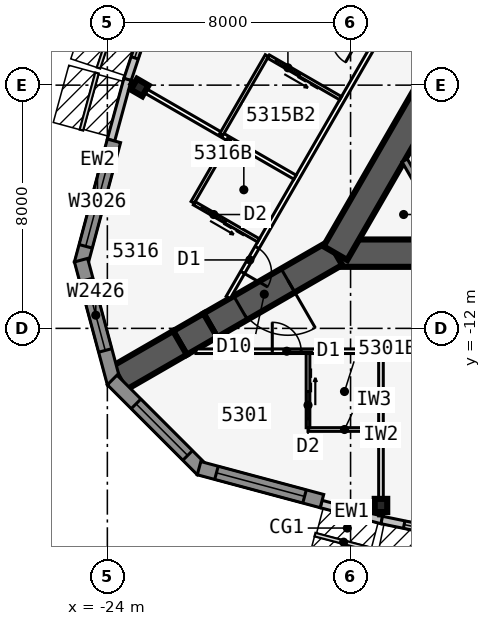
"""IFC4 building model, lengths in metres.
Left out: names, types, materials, properties, quantities, classifications, styles, units other than length and angle.
Written with IfcOpenShell. Run it as: python <this file> out.ifc"""

import sys

from ifc_helpers import new_model, si_unit, direction, frame, frame_2d, origin, origin_2d, place, context, subcontext, project, spatial, polyline, rectangle, i_section, outline, extrude, element, fill, save


model = new_model("IFC4")
c1 = context("Model", 3, precision=1e-05, world=origin(), true_north=direction((0.0, 1.0)))
c2 = subcontext(c1, "Body", "Model", "MODEL_VIEW")
j1 = project(units=[si_unit("LENGTHUNIT", "METRE"), si_unit("PLANEANGLEUNIT", "RADIAN")], contexts=[c1])
p1 = place(None, origin())
s1 = spatial("IfcSite", under=j1, at=p1, CompositionType="ELEMENT")
p2 = place(p1, origin())
s2 = spatial("IfcBuilding", under=s1, at=p2, CompositionType="ELEMENT")
p3 = place(p2, frame((0.0, 0.0, 200.9)))
s3 = spatial("IfcBuildingStorey", under=s2, at=p3, CompositionType="ELEMENT", Elevation=200.9)
p4 = place(p3, frame((-16.5, -9.526, 0.0), z_axis=(0.0, 0.0, 1.0), x_axis=(1.0, 0.0, 0.0)))
e1 = element("IfcWall", 1, at=p4, inside=s3, PredefinedType="SHEAR", context=c2, shape_type="SweptSolid", body=[
    extrude(rectangle(XDim=33.0, YDim=0.9, at=frame_2d((16.5, 0.0))), origin(), (0.0, 0.0, 1.0), 3.6),
])
p5 = place(p4, frame((14.05, 0.0, 0.0)))
e2 = element("IfcOpeningElement", 2, at=p5, cuts=e1, PredefinedType="OPENING", context=c2, shape_type="SweptSolid", body=[
    extrude(rectangle(XDim=1.8, YDim=2.13, at=frame_2d((0.9, 1.065))), frame((0.0, 0.46, 0.0), z_axis=(0.0, -1.0, 0.0), x_axis=(1.0, 0.0, 0.0)), (0.0, 0.0, 1.0), 0.92),
])
p6 = place(p3, frame((0.0, 19.052, 0.0), z_axis=(0.0, 0.0, 1.0), x_axis=(-0.499999749417, -0.866025548458, 0.0)))
e3 = element("IfcWall", 3, at=p6, inside=s3, PredefinedType="SHEAR", context=c2, shape_type="SweptSolid", body=[
    extrude(rectangle(XDim=33.0, YDim=0.9, at=frame_2d((16.5, 0.0))), origin(), (0.0, 0.0, 1.0), 3.6),
])
p7 = place(p6, frame((14.15, 0.0, 0.0)))
e4 = element("IfcOpeningElement", 4, at=p7, cuts=e3, PredefinedType="OPENING", context=c2, shape_type="SweptSolid", body=[
    extrude(rectangle(XDim=1.8, YDim=2.13, at=frame_2d((0.9, 1.065))), frame((0.0, 0.46, 0.0), z_axis=(0.0, -1.0, 0.0), x_axis=(1.0, 0.0, 0.0)), (0.0, 0.0, 1.0), 0.92),
])
p8 = place(p6, frame((12.6, 0.0, 0.0)))
e5 = element("IfcOpeningElement", 5, at=p8, cuts=e3, PredefinedType="OPENING", context=c2, shape_type="SweptSolid", body=[
    extrude(rectangle(XDim=1.0, YDim=2.13, at=frame_2d((0.5, 1.065))), frame((0.0, 0.46, 0.0), z_axis=(0.0, -1.0, 0.0), x_axis=(1.0, 0.0, 0.0)), (0.0, 0.0, 1.0), 0.92),
])
p9 = place(p3, frame((-16.5, -9.526, 0.0), z_axis=(0.0, 0.0, 1.0), x_axis=(-0.866031398331, -0.499989616998, 0.0)))
e6 = element("IfcWall", 6, at=p9, inside=s3, PredefinedType="SHEAR", context=c2, shape_type="SweptSolid", body=[
    extrude(rectangle(XDim=4.746, YDim=0.9, at=frame_2d((2.373, 0.0))), origin(), (0.0, 0.0, 1.0), 3.6),
])
p10 = place(p9, frame((1.8, 0.0, 0.0)))
e7 = element("IfcOpeningElement", 7, at=p10, cuts=e6, PredefinedType="OPENING", context=c2, shape_type="SweptSolid", body=[
    extrude(rectangle(XDim=1.8, YDim=2.13, at=frame_2d((0.9, 1.065))), frame((0.0, 0.46, 0.0), z_axis=(0.0, -1.0, 0.0), x_axis=(1.0, 0.0, 0.0)), (0.0, 0.0, 1.0), 0.92),
])
p11 = place(p3, frame((-20.61, -11.899, 0.0), z_axis=(0.0, 0.0, 1.0), x_axis=(-0.866009537788, -0.500027479704, 0.0)))
e8 = element("IfcWall", 8, at=p11, inside=s3, PredefinedType="SHEAR", context=c2, shape_type="SweptSolid", body=[
    extrude(rectangle(XDim=1.155, YDim=0.9, at=frame_2d((0.577, 0.0))), origin(), (0.0, 0.0, 1.0), 3.6),
])
p12 = place(p3, frame((-21.61, -12.477, 0.0), z_axis=(0.0, 0.0, 1.0), x_axis=(-0.866055313784, -0.499948190782, 0.0)))
e9 = element("IfcWall", 9, at=p12, inside=s3, PredefinedType="SHEAR", context=c2, shape_type="SweptSolid", body=[
    extrude(rectangle(XDim=2.309, YDim=0.9, at=frame_2d((1.155, 0.0))), origin(), (0.0, 0.0, 1.0), 3.6),
])
for number, where, z_axis, x_axis in (
    (10, (-15.0, -17.825, 0.0), (0.0, 0.0, 1.0), (1.0, 0.0, 0.0)),
    (11, (-22.937, -4.078, 0.0), (0.0, 0.0, 1.0), (-0.5, -0.866, 0.0)),
):
    element("IfcColumn", number, at=place(p3, frame(where, z_axis=z_axis, x_axis=x_axis)), inside=s3, PredefinedType="COLUMN", context=c2, shape_type="SweptSolid", body=[
        extrude(i_section(OverallWidth=0.411, OverallDepth=0.434, WebThickness=0.036, FlangeThickness=0.057, at=origin_2d()), origin(), (0.0, 0.0, 1.0), 3.6),
    ])
p13 = place(p3, frame((-16.968, -17.777, 0.0), z_axis=(0.0, 0.0, 1.0), x_axis=(0.967010286052, -0.254737328772, 0.0)))
e12 = element("IfcWall", 12, at=p13, inside=s3, PredefinedType="STANDARD", context=c2, shape_type="SweptSolid", body=[
    extrude(rectangle(XDim=2.068, YDim=0.25, at=frame_2d((1.034, 0.0))), origin(), (0.0, 0.0, 1.0), 3.435),
])
p14 = place(p3, frame((-14.975, -18.302, 0.0), z_axis=(0.0, 0.0, 1.0), x_axis=(0.979461488189, -0.201631329795, 0.0)))
e13 = element("IfcWall", 13, at=p14, inside=s3, PredefinedType="STANDARD", context=c2, shape_type="SweptSolid", body=[
    extrude(rectangle(XDim=5.105, YDim=0.25, at=frame_2d((2.552, 0.0))), origin(), (0.0, 0.0, 1.0), 3.435),
])
p15 = place(p14, frame((0.752, 0.0, 0.45)))
e14 = element("IfcOpeningElement", 14, at=p15, cuts=e13, PredefinedType="OPENING", context=c2, shape_type="SweptSolid", body=[
    extrude(rectangle(XDim=3.6, YDim=2.6, at=frame_2d((1.8, 1.3))), frame((0.0, 0.135, 0.0), z_axis=(0.0, -1.0, 0.0), x_axis=(1.0, 0.0, 0.0)), (0.0, 0.0, 1.0), 0.27),
])
p16 = place(p3, frame((-21.729, 1.028, 0.0), z_axis=(0.0, 0.0, 1.0), x_axis=(-0.315108478109, -0.949055660656, 0.0)))
e15 = element("IfcWall", 15, at=p16, inside=s3, PredefinedType="STANDARD", context=c2, shape_type="SweptSolid", body=[
    extrude(rectangle(XDim=5.105, YDim=0.25, at=frame_2d((2.552, 0.0))), origin(), (0.0, 0.0, 1.0), 3.435),
])
p17 = place(p16, frame((0.752, 0.0, 0.45)))
e16 = element("IfcOpeningElement", 16, at=p17, cuts=e15, PredefinedType="OPENING", context=c2, shape_type="SweptSolid", body=[
    extrude(rectangle(XDim=3.6, YDim=2.6, at=frame_2d((1.8, 1.3))), frame((0.0, 0.135, 0.0), z_axis=(0.0, -1.0, 0.0), x_axis=(1.0, 0.0, 0.0)), (0.0, 0.0, 1.0), 0.27),
])
p18 = place(p3, frame((-23.336, -3.811, 0.0), z_axis=(0.0, 0.0, 1.0), x_axis=(-0.262867703986, -0.964831887015, 0.0)))
e17 = element("IfcWall", 17, at=p18, inside=s3, PredefinedType="STANDARD", context=c2, shape_type="SweptSolid", body=[
    extrude(rectangle(XDim=2.068, YDim=0.25, at=frame_2d((1.034, 0.0))), origin(), (0.0, 0.0, 1.0), 3.435),
])
p19 = place(p3, frame((-23.783, -5.832, 0.0), z_axis=(0.0, 0.0, 1.0), x_axis=(-0.258784695888, -0.965935029479, 0.0)))
e18 = element("IfcWall", 18, at=p19, inside=s3, PredefinedType="SOLIDWALL", context=c2, shape_type="SweptSolid", body=[
    extrude(rectangle(XDim=4.184, YDim=0.45, at=frame_2d((2.092, 0.0))), origin(), (0.0, 0.0, 1.0), 3.435),
])
p20 = place(p19, frame((0.592, 0.0, 0.45)))
e19 = element("IfcOpeningElement", 19, at=p20, cuts=e18, PredefinedType="OPENING", context=c2, shape_type="SweptSolid", body=[
    extrude(rectangle(XDim=3.0, YDim=2.6, at=frame_2d((1.5, 1.3))), frame((0.0, 0.235, 0.0), z_axis=(0.0, -1.0, 0.0), x_axis=(1.0, 0.0, 0.0)), (0.0, 0.0, 1.0), 0.47),
])
p21 = place(p3, frame((-24.865, -9.757, 0.0), z_axis=(0.0, 0.0, 1.0), x_axis=(0.258799282522, -0.96593112144, 0.0)))
e20 = element("IfcWall", 20, at=p21, inside=s3, PredefinedType="SOLIDWALL", context=c2, shape_type="SweptSolid", body=[
    extrude(outline(polyline([(4.184, 0.225), (4.125, 0.225), (3.633, 0.093), (3.597, 0.225), (0.0, 0.225), (0.0, -0.225), (4.184, -0.225), (4.184, 0.225)])), origin(), (0.0, 0.0, 1.0), 3.435),
])
p22 = place(p21, frame((0.674, 0.0, 0.45)))
e21 = element("IfcOpeningElement", 21, at=p22, cuts=e20, PredefinedType="OPENING", context=c2, shape_type="SweptSolid", body=[
    extrude(rectangle(XDim=2.4, YDim=2.6, at=frame_2d((1.2, 1.3))), frame((0.0, 0.235, 0.0), z_axis=(0.0, -1.0, 0.0), x_axis=(1.0, 0.0, 0.0)), (0.0, 0.0, 1.0), 0.47),
])
p23 = place(p3, frame((-23.841, -13.697, 0.0), z_axis=(0.0, 0.0, 1.0), x_axis=(0.707077605902, -0.707135955267, 0.0)))
e22 = element("IfcWall", 22, at=p23, inside=s3, PredefinedType="SOLIDWALL", context=c2, shape_type="SweptSolid", body=[
    extrude(outline(polyline([(4.184, 0.225), (0.586, 0.225), (0.551, 0.093), (0.059, 0.225), (0.0, 0.225), (0.0, -0.225), (4.184, -0.225), (4.184, 0.225)])), origin(), (0.0, 0.0, 1.0), 3.435),
])
p24 = place(p23, frame((1.11, 0.0, 0.45)))
e23 = element("IfcOpeningElement", 23, at=p24, cuts=e22, PredefinedType="OPENING", context=c2, shape_type="SweptSolid", body=[
    extrude(rectangle(XDim=2.4, YDim=2.6, at=frame_2d((1.2, 1.3))), frame((0.0, 0.235, 0.0), z_axis=(0.0, -1.0, 0.0), x_axis=(1.0, 0.0, 0.0)), (0.0, 0.0, 1.0), 0.47),
])
p25 = place(p3, frame((-20.983, -16.598, 0.0), z_axis=(0.0, 0.0, 1.0), x_axis=(0.965920442324, -0.258839137498, 0.0)))
e24 = element("IfcWall", 24, at=p25, inside=s3, PredefinedType="SOLIDWALL", context=c2, shape_type="SweptSolid", body=[
    extrude(rectangle(XDim=4.184, YDim=0.45, at=frame_2d((2.092, 0.0))), origin(), (0.0, 0.0, 1.0), 3.435),
])
p26 = place(p25, frame((0.592, 0.0, 0.45)))
e25 = element("IfcOpeningElement", 25, at=p26, cuts=e24, PredefinedType="OPENING", context=c2, shape_type="SweptSolid", body=[
    extrude(rectangle(XDim=3.0, YDim=2.6, at=frame_2d((1.5, 1.3))), frame((0.0, 0.235, 0.0), z_axis=(0.0, -1.0, 0.0), x_axis=(1.0, 0.0, 0.0)), (0.0, 0.0, 1.0), 0.47),
])
p27 = place(p3, frame((-21.086, -12.751, 0.0), z_axis=(0.0, 0.0, 1.0), x_axis=(1.0, 0.0, 0.0)))
e26 = element("IfcWall", 26, at=p27, inside=s3, PredefinedType="PARTITIONING", context=c2, shape_type="SweptSolid", body=[
    extrude(rectangle(XDim=42.172, YDim=0.15, at=frame_2d((21.086, 0.0))), origin(), (0.0, 0.0, 1.0), 3.435),
])
p28 = place(p27, frame((2.511, 0.0, 0.0)))
e27 = element("IfcOpeningElement", 27, at=p28, cuts=e26, PredefinedType="OPENING", context=c2, shape_type="SweptSolid", body=[
    extrude(rectangle(XDim=0.95, YDim=2.13, at=frame_2d((0.475, 1.065))), frame((0.0, 0.085, 0.0), z_axis=(0.0, -1.0, 0.0), x_axis=(1.0, 0.0, 0.0)), (0.0, 0.0, 1.0), 0.17),
])
p29 = place(p27, frame((8.111, 0.0, 0.0)))
e28 = element("IfcOpeningElement", 28, at=p29, cuts=e26, PredefinedType="OPENING", context=c2, shape_type="SweptSolid", body=[
    extrude(rectangle(XDim=0.95, YDim=2.13, at=frame_2d((0.475, 1.065))), frame((0.0, 0.085, 0.0), z_axis=(0.0, -1.0, 0.0), x_axis=(1.0, 0.0, 0.0)), (0.0, 0.0, 1.0), 0.17),
])
p30 = place(p27, frame((18.711, 0.0, 0.0)))
e29 = element("IfcOpeningElement", 29, at=p30, cuts=e26, PredefinedType="OPENING", context=c2, shape_type="SweptSolid", body=[
    extrude(rectangle(XDim=0.95, YDim=2.13, at=frame_2d((0.475, 1.065))), frame((0.0, 0.085, 0.0), z_axis=(0.0, -1.0, 0.0), x_axis=(1.0, 0.0, 0.0)), (0.0, 0.0, 1.0), 0.17),
])
p31 = place(p27, frame((23.086, 0.0, 0.0)))
e30 = element("IfcOpeningElement", 30, at=p31, cuts=e26, PredefinedType="OPENING", context=c2, shape_type="SweptSolid", body=[
    extrude(rectangle(XDim=1.0, YDim=2.13, at=frame_2d((0.5, 1.065))), frame((0.0, 0.085, 0.0), z_axis=(0.0, -1.0, 0.0), x_axis=(1.0, 0.0, 0.0)), (0.0, 0.0, 1.0), 0.17),
])
p32 = place(p27, frame((29.311, 0.0, 0.0)))
e31 = element("IfcOpeningElement", 31, at=p32, cuts=e26, PredefinedType="OPENING", context=c2, shape_type="SweptSolid", body=[
    extrude(rectangle(XDim=0.95, YDim=2.13, at=frame_2d((0.475, 1.065))), frame((0.0, 0.085, 0.0), z_axis=(0.0, -1.0, 0.0), x_axis=(1.0, 0.0, 0.0)), (0.0, 0.0, 1.0), 0.17),
])
p33 = place(p27, frame((38.711, 0.0, 0.0)))
e32 = element("IfcOpeningElement", 32, at=p33, cuts=e26, PredefinedType="OPENING", context=c2, shape_type="SweptSolid", body=[
    extrude(rectangle(XDim=0.95, YDim=2.13, at=frame_2d((0.475, 1.065))), frame((0.0, 0.085, 0.0), z_axis=(0.0, -1.0, 0.0), x_axis=(1.0, 0.0, 0.0)), (0.0, 0.0, 1.0), 0.17),
])
p34 = place(p3, frame((-15.0, -12.826, 0.0), z_axis=(0.0, 0.0, 1.0), x_axis=(0.0, -1.0, 0.0)))
e33 = element("IfcWall", 33, at=p34, inside=s3, PredefinedType="PARTITIONING", context=c2, shape_type="SweptSolid", body=[
    extrude(rectangle(XDim=5.34, YDim=0.15, at=frame_2d((2.67, 0.0))), origin(), (0.0, 0.0, 1.0), 2.589),
])
p35 = place(p3, frame((-17.4, -15.326, 0.0), z_axis=(0.0, 0.0, 1.0), x_axis=(1.0, 0.0, 0.0)))
e34 = element("IfcWall", 34, at=p35, inside=s3, PredefinedType="PLUMBINGWALL", context=c2, shape_type="SweptSolid", body=[
    extrude(rectangle(XDim=2.4, YDim=0.12, at=frame_2d((1.2, 0.0))), origin(), (0.0, 0.0, 1.0), 3.435),
])
p36 = place(p3, frame((-17.4, -12.826, 0.0), z_axis=(0.0, 0.0, 1.0), x_axis=(0.0, -1.0, 0.0)))
e35 = element("IfcWall", 35, at=p36, inside=s3, PredefinedType="PLUMBINGWALL", context=c2, shape_type="SweptSolid", body=[
    extrude(rectangle(XDim=2.44, YDim=0.12, at=frame_2d((1.22, 0.0))), origin(), (0.0, 0.0, 1.0), 3.435),
])
p37 = place(p36, frame((1.25, 0.0, 0.0)))
e36 = element("IfcOpeningElement", 36, at=p37, cuts=e35, PredefinedType="OPENING", context=c2, shape_type="SweptSolid", body=[
    extrude(rectangle(XDim=0.9, YDim=2.13, at=frame_2d((0.45, 1.065))), frame((0.0, 0.07, 0.0), z_axis=(0.0, -1.0, 0.0), x_axis=(1.0, 0.0, 0.0)), (0.0, 0.0, 1.0), 0.14),
])
p38 = place(p3, frame((-0.5, 22.836, 0.0), z_axis=(0.0, 0.0, 1.0), x_axis=(-0.500001677587, -0.866024435227, 0.0)))
e37 = element("IfcWall", 37, at=p38, inside=s3, PredefinedType="PARTITIONING", context=c2, shape_type="SweptSolid", body=[
    extrude(rectangle(XDim=39.054, YDim=0.15, at=frame_2d((19.527, 0.0))), origin(), (0.0, 0.0, 1.0), 3.435),
])
p39 = place(p38, frame((0.952, 0.0, 0.0)))
e38 = element("IfcOpeningElement", 38, at=p39, cuts=e37, PredefinedType="OPENING", context=c2, shape_type="SweptSolid", body=[
    extrude(rectangle(XDim=0.95, YDim=2.13, at=frame_2d((0.475, 1.065))), frame((0.0, 0.085, 0.0), z_axis=(0.0, -1.0, 0.0), x_axis=(1.0, 0.0, 0.0)), (0.0, 0.0, 1.0), 0.17),
])
p40 = place(p38, frame((7.752, 0.0, 0.0)))
e39 = element("IfcOpeningElement", 39, at=p40, cuts=e37, PredefinedType="OPENING", context=c2, shape_type="SweptSolid", body=[
    extrude(rectangle(XDim=0.95, YDim=2.13, at=frame_2d((0.475, 1.065))), frame((0.0, 0.085, 0.0), z_axis=(0.0, -1.0, 0.0), x_axis=(1.0, 0.0, 0.0)), (0.0, 0.0, 1.0), 0.17),
])
p41 = place(p38, frame((17.152, 0.0, 0.0)))
e40 = element("IfcOpeningElement", 40, at=p41, cuts=e37, PredefinedType="OPENING", context=c2, shape_type="SweptSolid", body=[
    extrude(rectangle(XDim=0.95, YDim=2.13, at=frame_2d((0.475, 1.065))), frame((0.0, 0.085, 0.0), z_axis=(0.0, -1.0, 0.0), x_axis=(1.0, 0.0, 0.0)), (0.0, 0.0, 1.0), 0.17),
])
p42 = place(p38, frame((26.552, 0.0, 0.0)))
e41 = element("IfcOpeningElement", 41, at=p42, cuts=e37, PredefinedType="OPENING", context=c2, shape_type="SweptSolid", body=[
    extrude(rectangle(XDim=0.95, YDim=2.13, at=frame_2d((0.475, 1.065))), frame((0.0, 0.085, 0.0), z_axis=(0.0, -1.0, 0.0), x_axis=(1.0, 0.0, 0.0)), (0.0, 0.0, 1.0), 0.17),
])
p43 = place(p38, frame((37.152, 0.0, 0.0)))
e42 = element("IfcOpeningElement", 42, at=p43, cuts=e37, PredefinedType="OPENING", context=c2, shape_type="SweptSolid", body=[
    extrude(rectangle(XDim=0.95, YDim=2.13, at=frame_2d((0.475, 1.065))), frame((0.0, 0.085, 0.0), z_axis=(0.0, -1.0, 0.0), x_axis=(1.0, 0.0, 0.0)), (0.0, 0.0, 1.0), 0.17),
])
p44 = place(p3, frame((-17.829, -7.027, 0.0), z_axis=(0.0, 0.0, 1.0), x_axis=(-0.866026604282, 0.499997920671, 0.0)))
e43 = element("IfcWall", 43, at=p44, inside=s3, PredefinedType="PARTITIONING", context=c2, shape_type="SweptSolid", body=[
    extrude(rectangle(XDim=6.24, YDim=0.15, at=frame_2d((3.12, 0.0))), origin(), (0.0, 0.0, 1.0), 2.589),
])
p45 = place(p3, frame((-18.753, -3.029, 0.0), z_axis=(0.0, 0.0, 1.0), x_axis=(-0.50002537861, -0.866010750942, 0.0)))
e44 = element("IfcWall", 44, at=p45, inside=s3, PredefinedType="PLUMBINGWALL", context=c2, shape_type="SweptSolid", body=[
    extrude(rectangle(XDim=3.0, YDim=0.12, at=frame_2d((1.5, 0.0))), origin(), (0.0, 0.0, 1.0), 3.435),
])
p46 = place(p3, frame((-16.329, -4.429, 0.0), z_axis=(0.0, 0.0, 1.0), x_axis=(-0.865997131366, 0.500048966069, 0.0)))
e45 = element("IfcWall", 45, at=p46, inside=s3, PredefinedType="PLUMBINGWALL", context=c2, shape_type="SweptSolid", body=[
    extrude(rectangle(XDim=2.74, YDim=0.12, at=frame_2d((1.37, 0.0))), origin(), (0.0, 0.0, 1.0), 3.435),
])
p47 = place(p46, frame((1.55, 0.0, 0.0)))
e46 = element("IfcOpeningElement", 46, at=p47, cuts=e45, PredefinedType="OPENING", context=c2, shape_type="SweptSolid", body=[
    extrude(rectangle(XDim=0.9, YDim=2.13, at=frame_2d((0.45, 1.065))), frame((0.0, 0.07, 0.0), z_axis=(0.0, -1.0, 0.0), x_axis=(1.0, 0.0, 0.0)), (0.0, 0.0, 1.0), 0.14),
])
p48 = place(p3, frame((-19.993, -5.777, 0.0), z_axis=(0.0, 0.0, 1.0), x_axis=(-0.500033551112, -0.866006032174, 0.0)))
e47 = element("IfcWall", 47, at=p48, inside=s3, PredefinedType="PLUMBINGWALL", context=c2, shape_type="SweptSolid", body=[
    extrude(rectangle(XDim=2.4, YDim=0.12, at=frame_2d((1.2, 0.0))), origin(), (0.0, 0.0, 1.0), 3.435),
])
p49 = place(p3, frame((-19.029, -9.106, 0.0), z_axis=(0.0, 0.0, 1.0), x_axis=(-0.866023955769, 0.500002508028, 0.0)))
e48 = element("IfcWall", 48, at=p49, inside=s3, PredefinedType="PLUMBINGWALL", context=c2, shape_type="SweptSolid", body=[
    extrude(rectangle(XDim=2.44, YDim=0.12, at=frame_2d((1.22, 0.0))), origin(), (0.0, 0.0, 1.0), 3.435),
])
p50 = place(p49, frame((1.25, 0.0, 0.0)))
e49 = element("IfcOpeningElement", 49, at=p50, cuts=e48, PredefinedType="OPENING", context=c2, shape_type="SweptSolid", body=[
    extrude(rectangle(XDim=0.9, YDim=2.13, at=frame_2d((0.45, 1.065))), frame((0.0, 0.07, 0.0), z_axis=(0.0, -1.0, 0.0), x_axis=(1.0, 0.0, 0.0)), (0.0, 0.0, 1.0), 0.14),
])
p51 = place(p3, frame((-12.719, -9.076, 0.0), z_axis=(0.0, 0.0, 1.0), x_axis=(-0.499952404951, 0.866052881055, 0.0)))
e50 = element("IfcWall", 50, at=p51, inside=s3, PredefinedType="SOLIDWALL", context=c2, shape_type="SweptSolid", body=[
    extrude(rectangle(XDim=3.002, YDim=0.2, at=frame_2d((1.501, 0.0))), origin(), (0.0, 0.0, 1.0), 3.435),
])
p52 = place(p15, origin())
e51 = element("IfcWindow", 51, at=p52, inside=s3, PartitioningType="SINGLE_PANEL", PredefinedType="WINDOW", context=c2, shape_type="SweptSolid", body=[
    extrude(rectangle(XDim=3.6, YDim=2.6, at=frame_2d((1.8, 1.3))), frame((0.0, 0.03, 0.0), z_axis=(0.0, -1.0, 0.0), x_axis=(1.0, 0.0, 0.0)), (0.0, 0.0, 1.0), 0.06),
])
fill(e14, e51)
p53 = place(p17, origin())
e52 = element("IfcWindow", 52, at=p53, inside=s3, PartitioningType="SINGLE_PANEL", PredefinedType="WINDOW", context=c2, shape_type="SweptSolid", body=[
    extrude(rectangle(XDim=3.6, YDim=2.6, at=frame_2d((1.8, 1.3))), frame((0.0, 0.03, 0.0), z_axis=(0.0, -1.0, 0.0), x_axis=(1.0, 0.0, 0.0)), (0.0, 0.0, 1.0), 0.06),
])
fill(e16, e52)
p54 = place(p20, origin())
e53 = element("IfcWindow", 53, at=p54, inside=s3, PartitioningType="SINGLE_PANEL", PredefinedType="WINDOW", context=c2, shape_type="SweptSolid", body=[
    extrude(rectangle(XDim=3.0, YDim=2.6, at=frame_2d((1.5, 1.3))), frame((0.0, 0.03, 0.0), z_axis=(0.0, -1.0, 0.0), x_axis=(1.0, 0.0, 0.0)), (0.0, 0.0, 1.0), 0.06),
])
fill(e19, e53)
p55 = place(p22, origin())
e54 = element("IfcWindow", 54, at=p55, inside=s3, PartitioningType="SINGLE_PANEL", PredefinedType="WINDOW", context=c2, shape_type="SweptSolid", body=[
    extrude(rectangle(XDim=2.4, YDim=2.6, at=frame_2d((1.2, 1.3))), frame((0.0, 0.03, 0.0), z_axis=(0.0, -1.0, 0.0), x_axis=(1.0, 0.0, 0.0)), (0.0, 0.0, 1.0), 0.06),
])
fill(e21, e54)
p56 = place(p24, origin())
e55 = element("IfcWindow", 55, at=p56, inside=s3, PartitioningType="SINGLE_PANEL", PredefinedType="WINDOW", context=c2, shape_type="SweptSolid", body=[
    extrude(rectangle(XDim=2.4, YDim=2.6, at=frame_2d((1.2, 1.3))), frame((0.0, 0.03, 0.0), z_axis=(0.0, -1.0, 0.0), x_axis=(1.0, 0.0, 0.0)), (0.0, 0.0, 1.0), 0.06),
])
fill(e23, e55)
p57 = place(p26, origin())
e56 = element("IfcWindow", 56, at=p57, inside=s3, PartitioningType="SINGLE_PANEL", PredefinedType="WINDOW", context=c2, shape_type="SweptSolid", body=[
    extrude(rectangle(XDim=3.0, YDim=2.6, at=frame_2d((1.5, 1.3))), frame((0.0, 0.03, 0.0), z_axis=(0.0, -1.0, 0.0), x_axis=(1.0, 0.0, 0.0)), (0.0, 0.0, 1.0), 0.06),
])
fill(e25, e56)
p58 = place(p37, origin())
e57 = element("IfcDoor", 57, at=p58, inside=s3, OperationType="SLIDING_TO_LEFT", PredefinedType="DOOR", context=c2, shape_type="SweptSolid", body=[
    extrude(rectangle(XDim=0.9, YDim=2.13, at=frame_2d((0.45, 1.065))), frame((0.0, 0.025, 0.0), z_axis=(0.0, -1.0, 0.0), x_axis=(1.0, 0.0, 0.0)), (0.0, 0.0, 1.0), 0.05),
])
fill(e36, e57)
p59 = place(p28, origin())
e58 = element("IfcDoor", 58, at=p59, inside=s3, OperationType="SINGLE_SWING_LEFT", PredefinedType="DOOR", context=c2, shape_type="SweptSolid", body=[
    extrude(rectangle(XDim=0.95, YDim=2.13, at=frame_2d((0.475, 1.065))), frame((0.0, 0.025, 0.0), z_axis=(0.0, -1.0, 0.0), x_axis=(1.0, 0.0, 0.0)), (0.0, 0.0, 1.0), 0.05),
])
fill(e27, e58)
p60 = place(p47, origin())
e59 = element("IfcDoor", 59, at=p60, inside=s3, OperationType="SLIDING_TO_LEFT", PredefinedType="DOOR", context=c2, shape_type="SweptSolid", body=[
    extrude(rectangle(XDim=0.9, YDim=2.13, at=frame_2d((0.45, 1.065))), frame((0.0, 0.025, 0.0), z_axis=(0.0, -1.0, 0.0), x_axis=(1.0, 0.0, 0.0)), (0.0, 0.0, 1.0), 0.05),
])
fill(e46, e59)
p61 = place(p50, origin())
e60 = element("IfcDoor", 60, at=p61, inside=s3, OperationType="SLIDING_TO_LEFT", PredefinedType="DOOR", context=c2, shape_type="SweptSolid", body=[
    extrude(rectangle(XDim=0.9, YDim=2.13, at=frame_2d((0.45, 1.065))), frame((0.0, 0.025, 0.0), z_axis=(0.0, -1.0, 0.0), x_axis=(1.0, 0.0, 0.0)), (0.0, 0.0, 1.0), 0.05),
])
fill(e49, e60)
p62 = place(p43, origin())
e61 = element("IfcDoor", 61, at=p62, inside=s3, OperationType="SINGLE_SWING_RIGHT", PredefinedType="DOOR", context=c2, shape_type="SweptSolid", body=[
    extrude(rectangle(XDim=0.95, YDim=2.13, at=frame_2d((0.475, 1.065))), frame((0.0, 0.025, 0.0), z_axis=(0.0, -1.0, 0.0), x_axis=(1.0, 0.0, 0.0)), (0.0, 0.0, 1.0), 0.05),
])
fill(e42, e61)
p63 = place(p10, origin())
e62 = element("IfcDoor", 62, at=p63, inside=s3, OperationType="DOUBLE_DOOR_DOUBLE_SWING", PredefinedType="DOOR", context=c2, shape_type="SweptSolid", body=[
    extrude(rectangle(XDim=1.8, YDim=2.13, at=frame_2d((0.9, 1.065))), frame((0.0, 0.025, 0.0), z_axis=(0.0, -1.0, 0.0), x_axis=(1.0, 0.0, 0.0)), (0.0, 0.0, 1.0), 0.05),
])
fill(e7, e62)
save(model, sys.argv[1])
